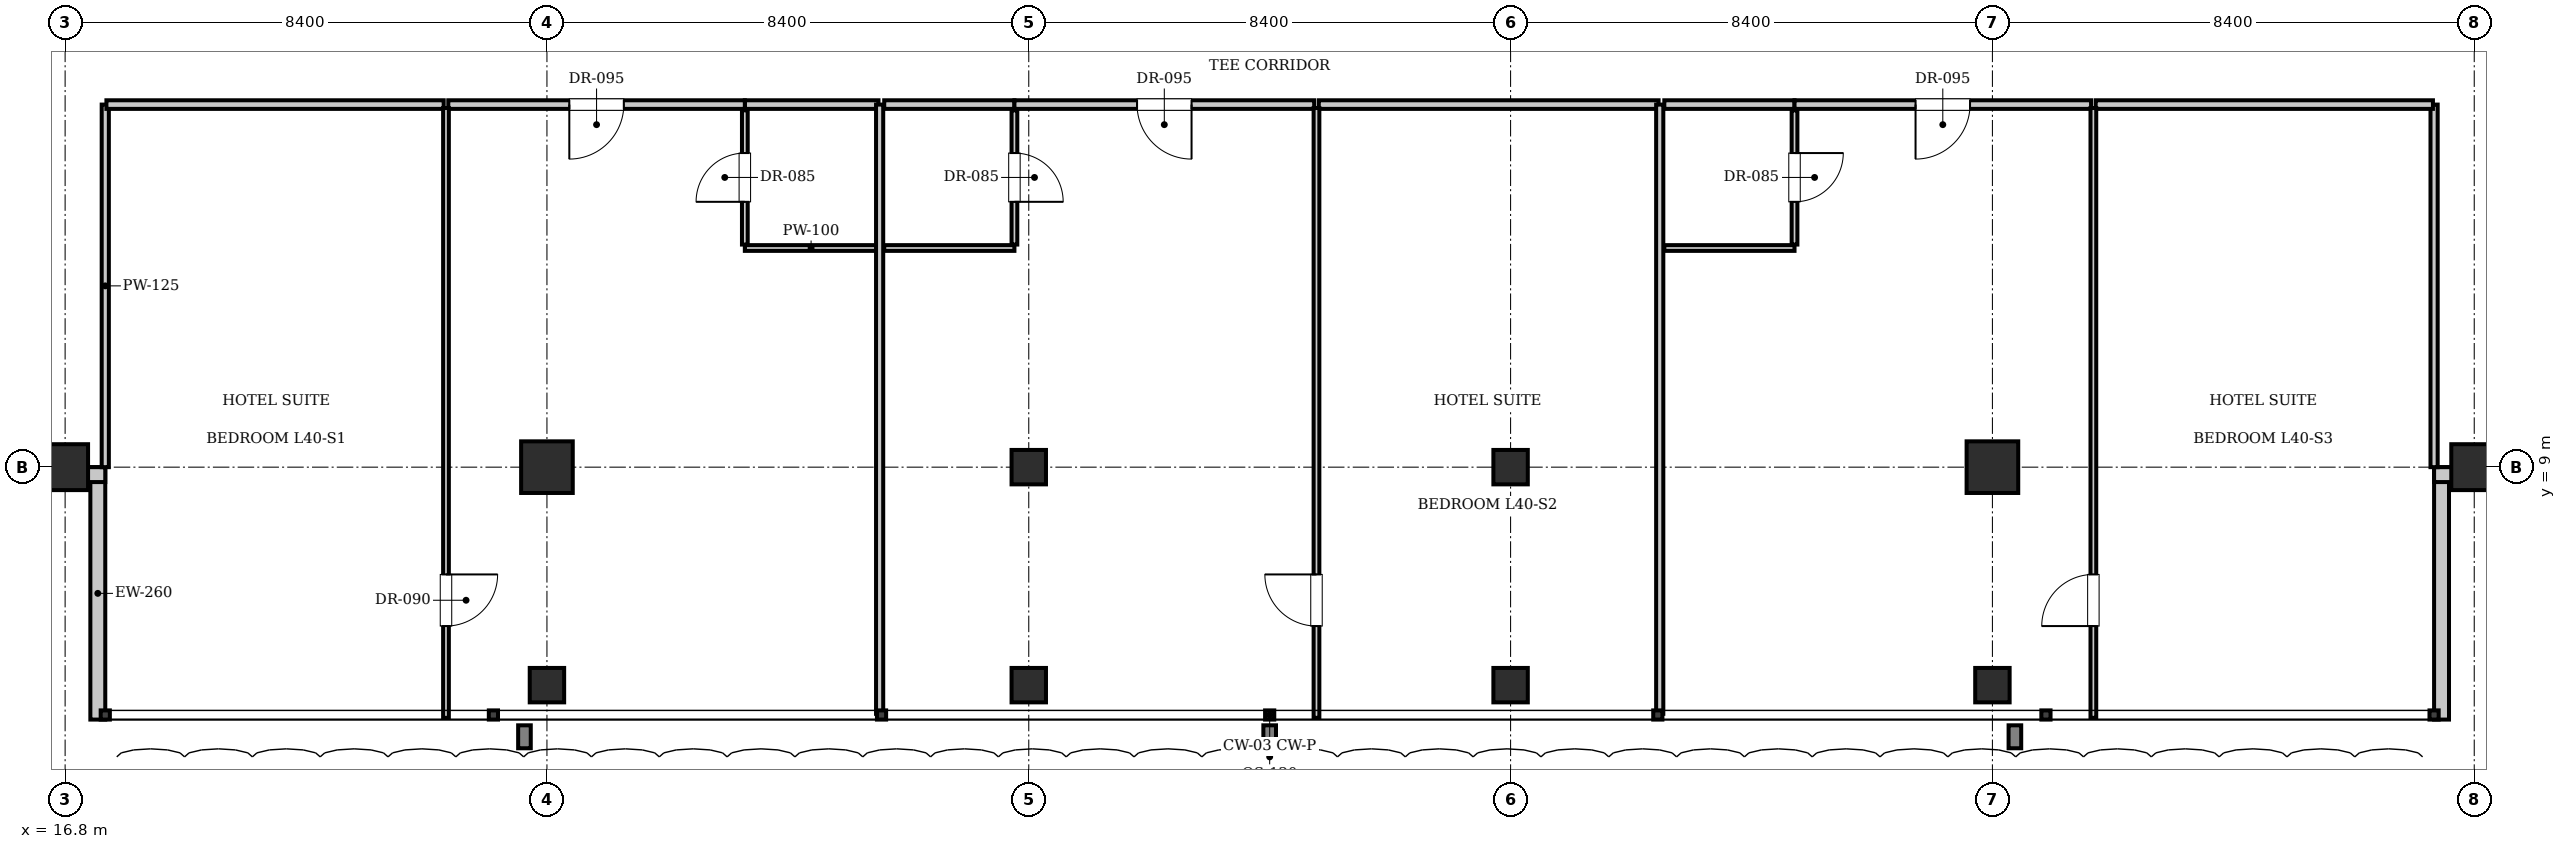
"""IFC4 building model, lengths in metres.
Left out: names, types, materials, properties, quantities, classifications, styles, units other than length and angle.
Written with IfcOpenShell. Run it as: python <this file> out.ifc"""

import sys

from ifc_helpers import new_model, si_unit, direction, frame, frame_2d, origin, origin_2d, place, context, subcontext, project, spatial, rectangle, i_section, extrude, element, fill, save


model = new_model("IFC4")
c1 = context("Model", 3, precision=1e-05, world=origin(), true_north=direction((0.0, 1.0)))
c2 = subcontext(c1, "Body", "Model", "MODEL_VIEW")
j1 = project(units=[si_unit("LENGTHUNIT", "METRE"), si_unit("PLANEANGLEUNIT", "RADIAN")], contexts=[c1])
p1 = place(None, origin())
s1 = spatial("IfcSite", under=j1, at=p1, CompositionType="ELEMENT")
p2 = place(p1, origin())
s2 = spatial("IfcBuilding", under=s1, at=p2, CompositionType="ELEMENT")
p3 = place(p2, frame((0.0, 0.0, 165.9)))
s3 = spatial("IfcBuildingStorey", under=s2, at=p3, CompositionType="ELEMENT", Elevation=165.9)
for number, where, z_axis, x_axis in (
    (1, (25.2, 9.0, 0.0), (0.0, 0.0, 1.0), (1.0, 0.0, 0.0)),
    (2, (50.4, 9.0, 0.0), (0.0, 0.0, 1.0), (1.0, 0.0, 0.0)),
):
    element("IfcColumn", number, at=place(p3, frame(where, z_axis=z_axis, x_axis=x_axis)), inside=s3, PredefinedType="COLUMN", context=c2, shape_type="SweptSolid", body=[
        extrude(rectangle(XDim=0.9, YDim=0.9, at=origin_2d()), origin(), (0.0, 0.0, 1.0), 3.85),
    ])
for number, where, z_axis, x_axis in (
    (3, (33.6, 9.0, 0.0), (0.0, 0.0, 1.0), (1.0, 0.0, 0.0)),
    (4, (42.0, 9.0, 0.0), (0.0, 0.0, 1.0), (1.0, 0.0, 0.0)),
):
    element("IfcColumn", number, at=place(p3, frame(where, z_axis=z_axis, x_axis=x_axis)), inside=s3, PredefinedType="COLUMN", context=c2, shape_type="SweptSolid", body=[
        extrude(i_section(OverallWidth=0.6, OverallDepth=0.6, WebThickness=0.025, FlangeThickness=0.038, at=origin_2d()), origin(), (0.0, 0.0, 1.0), 3.85),
    ])
for number, where, z_axis, x_axis in (
    (5, (16.8, 9.0, 0.0), (0.0, 0.0, 1.0), (1.0, 0.0, 0.0)),
    (6, (58.8, 9.0, 0.0), (0.0, 0.0, 1.0), (1.0, 0.0, 0.0)),
):
    element("IfcColumn", number, at=place(p3, frame(where, z_axis=z_axis, x_axis=x_axis)), inside=s3, PredefinedType="COLUMN", context=c2, shape_type="SweptSolid", body=[
        extrude(rectangle(XDim=0.8, YDim=0.8, at=origin_2d()), origin(), (0.0, 0.0, 1.0), 3.85),
    ])
for number, where, z_axis, x_axis in (
    (7, (25.2, 5.2, 0.0), (0.0, 0.0, 1.0), (1.0, 0.0, 0.0)),
    (8, (33.6, 5.2, 0.0), (0.0, 0.0, 1.0), (1.0, 0.0, 0.0)),
    (9, (42.0, 5.2, 0.0), (0.0, 0.0, 1.0), (1.0, 0.0, 0.0)),
    (10, (50.4, 5.2, 0.0), (0.0, 0.0, 1.0), (1.0, 0.0, 0.0)),
):
    element("IfcColumn", number, at=place(p3, frame(where, z_axis=z_axis, x_axis=x_axis)), inside=s3, PredefinedType="COLUMN", context=c2, shape_type="SweptSolid", body=[
        extrude(i_section(OverallWidth=0.6, OverallDepth=0.6, WebThickness=0.025, FlangeThickness=0.038, at=origin_2d()), origin(), (0.0, 0.0, 1.0), 3.85),
    ])
p4 = place(p3, frame((17.37, 4.6, 0.0), z_axis=(0.0, 0.0, 1.0), x_axis=(0.0, 1.0, 0.0)))
e11 = element("IfcWall", 11, at=p4, inside=s3, PredefinedType="SOLIDWALL", context=c2, shape_type="SweptSolid", body=[
    extrude(rectangle(XDim=4.4, YDim=0.26, at=frame_2d((2.2, 0.0))), origin(), (0.0, 0.0, 1.0), 3.61),
])
p5 = place(p3, frame((17.5, 8.87, 0.0), z_axis=(0.0, 0.0, 1.0), x_axis=(-1.0, 0.0, 0.0)))
e12 = element("IfcWall", 12, at=p5, inside=s3, PredefinedType="SOLIDWALL", context=c2, shape_type="SweptSolid", body=[
    extrude(rectangle(XDim=4.4, YDim=0.26, at=frame_2d((2.2, 0.0))), origin(), (0.0, 0.0, 1.0), 3.007),
])
p6 = place(p3, frame((58.23, 9.0, 0.0), z_axis=(0.0, 0.0, 1.0), x_axis=(0.0, -1.0, 0.0)))
e13 = element("IfcWall", 13, at=p6, inside=s3, PredefinedType="SOLIDWALL", context=c2, shape_type="SweptSolid", body=[
    extrude(rectangle(XDim=4.4, YDim=0.26, at=frame_2d((2.2, 0.0))), origin(), (0.0, 0.0, 1.0), 3.61),
])
p7 = place(p3, frame((62.5, 8.87, 0.0), z_axis=(0.0, 0.0, 1.0), x_axis=(-1.0, 0.0, 0.0)))
e14 = element("IfcWall", 14, at=p7, inside=s3, PredefinedType="SOLIDWALL", context=c2, shape_type="SweptSolid", body=[
    extrude(rectangle(XDim=4.4, YDim=0.26, at=frame_2d((2.2, 0.0))), origin(), (0.0, 0.0, 1.0), 3.007),
])
for number, where, z_axis, x_axis in (
    (15, (17.5, 9.0, 0.0), (0.0, 0.0, 1.0), (0.0, 1.0, 0.0)),
    (16, (58.1, 9.0, 0.0), (0.0, 0.0, 1.0), (0.0, 1.0, 0.0)),
):
    element("IfcWall", number, at=place(p3, frame(where, z_axis=z_axis, x_axis=x_axis)), inside=s3, PredefinedType="PARTITIONING", context=c2, shape_type="SweptSolid", body=[
        extrude(rectangle(XDim=6.32, YDim=0.125, at=frame_2d((3.16, 0.0))), origin(), (0.0, 0.0, 1.0), 3.61),
    ])
p8 = place(p3, frame((28.65, 15.32, 0.0), z_axis=(0.0, 0.0, 1.0), x_axis=(1.0, 0.0, 0.0)))
e17 = element("IfcWall", 17, at=p8, inside=s3, PredefinedType="PARTITIONING", context=c2, shape_type="SweptSolid", body=[
    extrude(rectangle(XDim=2.33, YDim=0.15, at=frame_2d((1.165, 0.0))), origin(), (0.0, 0.0, 1.0), 3.61),
])
p9 = place(p3, frame((28.65, 12.82, 0.0), z_axis=(0.0, 0.0, 1.0), x_axis=(1.0, 0.0, 0.0)))
e18 = element("IfcWall", 18, at=p9, inside=s3, PredefinedType="PARTITIONING", context=c2, shape_type="SweptSolid", body=[
    extrude(rectangle(XDim=2.31, YDim=0.1, at=frame_2d((1.155, 0.0))), origin(), (0.0, 0.0, 1.0), 3.61),
])
p10 = place(p3, frame((28.65, 12.88, 0.0), z_axis=(0.0, 0.0, 1.0), x_axis=(0.0, 1.0, 0.0)))
e19 = element("IfcWall", 19, at=p10, inside=s3, PredefinedType="PARTITIONING", context=c2, shape_type="SweptSolid", body=[
    extrude(rectangle(XDim=2.34, YDim=0.1, at=frame_2d((1.17, 0.0))), origin(), (0.0, 0.0, 1.0), 3.61),
])
p11 = place(p10, frame((0.745, 0.0, 0.0)))
e20 = element("IfcOpeningElement", 20, at=p11, cuts=e19, PredefinedType="OPENING", context=c2, shape_type="SweptSolid", body=[
    extrude(rectangle(XDim=0.85, YDim=2.1, at=frame_2d((0.425, 1.05))), frame((0.0, 0.06, 0.0), z_axis=(0.0, -1.0, 0.0), x_axis=(1.0, 0.0, 0.0)), (0.0, 0.0, 1.0), 0.12),
])
p12 = place(p3, frame((17.52, 15.32, 0.0), z_axis=(0.0, 0.0, 1.0), x_axis=(1.0, 0.0, 0.0)))
e21 = element("IfcWall", 21, at=p12, inside=s3, PredefinedType="PARTITIONING", context=c2, shape_type="SweptSolid", body=[
    extrude(rectangle(XDim=5.88, YDim=0.15, at=frame_2d((2.94, 0.0))), origin(), (0.0, 0.0, 1.0), 3.61),
])
p13 = place(p3, frame((23.48, 15.32, 0.0), z_axis=(0.0, 0.0, 1.0), x_axis=(1.0, 0.0, 0.0)))
e22 = element("IfcWall", 22, at=p13, inside=s3, PredefinedType="PARTITIONING", context=c2, shape_type="SweptSolid", body=[
    extrude(rectangle(XDim=5.17, YDim=0.15, at=frame_2d((2.585, 0.0))), origin(), (0.0, 0.0, 1.0), 3.61),
])
p14 = place(p13, frame((2.11, 0.0, 0.0)))
e23 = element("IfcOpeningElement", 23, at=p14, cuts=e22, PredefinedType="OPENING", context=c2, shape_type="SweptSolid", body=[
    extrude(rectangle(XDim=0.95, YDim=2.15, at=frame_2d((0.475, 1.075))), frame((0.0, 0.085, 0.0), z_axis=(0.0, -1.0, 0.0), x_axis=(1.0, 0.0, 0.0)), (0.0, 0.0, 1.0), 0.17),
])
p15 = place(p3, frame((23.44, 4.63, 0.0), z_axis=(0.0, 0.0, 1.0), x_axis=(0.0, 1.0, 0.0)))
e24 = element("IfcWall", 24, at=p15, inside=s3, PredefinedType="PARTITIONING", context=c2, shape_type="SweptSolid", body=[
    extrude(rectangle(XDim=10.63, YDim=0.1, at=frame_2d((5.315, 0.0))), origin(), (0.0, 0.0, 1.0), 3.61),
])
p16 = place(p15, frame((1.6, 0.0, 0.0)))
e25 = element("IfcOpeningElement", 25, at=p16, cuts=e24, PredefinedType="OPENING", context=c2, shape_type="SweptSolid", body=[
    extrude(rectangle(XDim=0.9, YDim=2.1, at=frame_2d((0.45, 1.05))), frame((0.0, 0.06, 0.0), z_axis=(0.0, -1.0, 0.0), x_axis=(1.0, 0.0, 0.0)), (0.0, 0.0, 1.0), 0.12),
])
p17 = place(p3, frame((31.0, 4.7, 0.0), z_axis=(0.0, 0.0, 1.0), x_axis=(0.0, 1.0, 0.0)))
e26 = element("IfcWall", 26, at=p17, inside=s3, PredefinedType="PARTITIONING", context=c2, shape_type="SweptSolid", body=[
    extrude(rectangle(XDim=10.62, YDim=0.125, at=frame_2d((5.31, 0.0))), origin(), (0.0, 0.0, 1.0), 3.61),
])
p18 = place(p3, frame((31.08, 15.32, 0.0), z_axis=(0.0, 0.0, 1.0), x_axis=(1.0, 0.0, 0.0)))
e27 = element("IfcWall", 27, at=p18, inside=s3, PredefinedType="PARTITIONING", context=c2, shape_type="SweptSolid", body=[
    extrude(rectangle(XDim=2.27, YDim=0.15, at=frame_2d((1.135, 0.0))), origin(), (0.0, 0.0, 1.0), 3.61),
])
p19 = place(p3, frame((31.08, 12.82, 0.0), z_axis=(0.0, 0.0, 1.0), x_axis=(1.0, 0.0, 0.0)))
e28 = element("IfcWall", 28, at=p19, inside=s3, PredefinedType="PARTITIONING", context=c2, shape_type="SweptSolid", body=[
    extrude(rectangle(XDim=2.27, YDim=0.1, at=frame_2d((1.135, 0.0))), origin(), (0.0, 0.0, 1.0), 3.61),
])
p20 = place(p3, frame((33.35, 12.88, 0.0), z_axis=(0.0, 0.0, 1.0), x_axis=(0.0, 1.0, 0.0)))
e29 = element("IfcWall", 29, at=p20, inside=s3, PredefinedType="PARTITIONING", context=c2, shape_type="SweptSolid", body=[
    extrude(rectangle(XDim=2.34, YDim=0.1, at=frame_2d((1.17, 0.0))), origin(), (0.0, 0.0, 1.0), 3.61),
])
p21 = place(p20, frame((0.745, 0.0, 0.0)))
e30 = element("IfcOpeningElement", 30, at=p21, cuts=e29, PredefinedType="OPENING", context=c2, shape_type="SweptSolid", body=[
    extrude(rectangle(XDim=0.85, YDim=2.1, at=frame_2d((0.425, 1.05))), frame((0.0, 0.06, 0.0), z_axis=(0.0, -1.0, 0.0), x_axis=(1.0, 0.0, 0.0)), (0.0, 0.0, 1.0), 0.12),
])
p22 = place(p3, frame((33.35, 15.32, 0.0), z_axis=(0.0, 0.0, 1.0), x_axis=(1.0, 0.0, 0.0)))
e31 = element("IfcWall", 31, at=p22, inside=s3, PredefinedType="PARTITIONING", context=c2, shape_type="SweptSolid", body=[
    extrude(rectangle(XDim=5.226, YDim=0.15, at=frame_2d((2.613, 0.0))), origin(), (0.0, 0.0, 1.0), 3.61),
])
p23 = place(p22, frame((2.138, 0.0, 0.0)))
e32 = element("IfcOpeningElement", 32, at=p23, cuts=e31, PredefinedType="OPENING", context=c2, shape_type="SweptSolid", body=[
    extrude(rectangle(XDim=0.95, YDim=2.15, at=frame_2d((0.475, 1.075))), frame((0.0, 0.085, 0.0), z_axis=(0.0, -1.0, 0.0), x_axis=(1.0, 0.0, 0.0)), (0.0, 0.0, 1.0), 0.17),
])
p24 = place(p3, frame((38.656, 15.32, 0.0), z_axis=(0.0, 0.0, 1.0), x_axis=(1.0, 0.0, 0.0)))
e33 = element("IfcWall", 33, at=p24, inside=s3, PredefinedType="PARTITIONING", context=c2, shape_type="SweptSolid", body=[
    extrude(rectangle(XDim=5.924, YDim=0.15, at=frame_2d((2.962, 0.0))), origin(), (0.0, 0.0, 1.0), 3.61),
])
p25 = place(p3, frame((38.616, 4.63, 0.0), z_axis=(0.0, 0.0, 1.0), x_axis=(0.0, 1.0, 0.0)))
e34 = element("IfcWall", 34, at=p25, inside=s3, PredefinedType="PARTITIONING", context=c2, shape_type="SweptSolid", body=[
    extrude(rectangle(XDim=10.63, YDim=0.1, at=frame_2d((5.315, 0.0))), origin(), (0.0, 0.0, 1.0), 3.61),
])
p26 = place(p25, frame((1.6, 0.0, 0.0)))
e35 = element("IfcOpeningElement", 35, at=p26, cuts=e34, PredefinedType="OPENING", context=c2, shape_type="SweptSolid", body=[
    extrude(rectangle(XDim=0.9, YDim=2.1, at=frame_2d((0.45, 1.05))), frame((0.0, 0.06, 0.0), z_axis=(0.0, -1.0, 0.0), x_axis=(1.0, 0.0, 0.0)), (0.0, 0.0, 1.0), 0.12),
])
p27 = place(p3, frame((44.6, 4.7, 0.0), z_axis=(0.0, 0.0, 1.0), x_axis=(0.0, 1.0, 0.0)))
e36 = element("IfcWall", 36, at=p27, inside=s3, PredefinedType="PARTITIONING", context=c2, shape_type="SweptSolid", body=[
    extrude(rectangle(XDim=10.62, YDim=0.125, at=frame_2d((5.31, 0.0))), origin(), (0.0, 0.0, 1.0), 3.61),
])
p28 = place(p3, frame((44.68, 15.32, 0.0), z_axis=(0.0, 0.0, 1.0), x_axis=(1.0, 0.0, 0.0)))
e37 = element("IfcWall", 37, at=p28, inside=s3, PredefinedType="PARTITIONING", context=c2, shape_type="SweptSolid", body=[
    extrude(rectangle(XDim=2.27, YDim=0.15, at=frame_2d((1.135, 0.0))), origin(), (0.0, 0.0, 1.0), 3.61),
])
p29 = place(p3, frame((44.68, 12.82, 0.0), z_axis=(0.0, 0.0, 1.0), x_axis=(1.0, 0.0, 0.0)))
e38 = element("IfcWall", 38, at=p29, inside=s3, PredefinedType="PARTITIONING", context=c2, shape_type="SweptSolid", body=[
    extrude(rectangle(XDim=2.27, YDim=0.1, at=frame_2d((1.135, 0.0))), origin(), (0.0, 0.0, 1.0), 3.61),
])
p30 = place(p3, frame((46.95, 12.88, 0.0), z_axis=(0.0, 0.0, 1.0), x_axis=(0.0, 1.0, 0.0)))
e39 = element("IfcWall", 39, at=p30, inside=s3, PredefinedType="PARTITIONING", context=c2, shape_type="SweptSolid", body=[
    extrude(rectangle(XDim=2.34, YDim=0.1, at=frame_2d((1.17, 0.0))), origin(), (0.0, 0.0, 1.0), 3.61),
])
p31 = place(p30, frame((0.745, 0.0, 0.0)))
e40 = element("IfcOpeningElement", 40, at=p31, cuts=e39, PredefinedType="OPENING", context=c2, shape_type="SweptSolid", body=[
    extrude(rectangle(XDim=0.85, YDim=2.1, at=frame_2d((0.425, 1.05))), frame((0.0, 0.06, 0.0), z_axis=(0.0, -1.0, 0.0), x_axis=(1.0, 0.0, 0.0)), (0.0, 0.0, 1.0), 0.12),
])
p32 = place(p3, frame((46.95, 15.32, 0.0), z_axis=(0.0, 0.0, 1.0), x_axis=(1.0, 0.0, 0.0)))
e41 = element("IfcWall", 41, at=p32, inside=s3, PredefinedType="PARTITIONING", context=c2, shape_type="SweptSolid", body=[
    extrude(rectangle(XDim=5.17, YDim=0.15, at=frame_2d((2.585, 0.0))), origin(), (0.0, 0.0, 1.0), 3.61),
])
p33 = place(p32, frame((2.11, 0.0, 0.0)))
e42 = element("IfcOpeningElement", 42, at=p33, cuts=e41, PredefinedType="OPENING", context=c2, shape_type="SweptSolid", body=[
    extrude(rectangle(XDim=0.95, YDim=2.15, at=frame_2d((0.475, 1.075))), frame((0.0, 0.085, 0.0), z_axis=(0.0, -1.0, 0.0), x_axis=(1.0, 0.0, 0.0)), (0.0, 0.0, 1.0), 0.17),
])
p34 = place(p3, frame((52.2, 15.32, 0.0), z_axis=(0.0, 0.0, 1.0), x_axis=(1.0, 0.0, 0.0)))
e43 = element("IfcWall", 43, at=p34, inside=s3, PredefinedType="PARTITIONING", context=c2, shape_type="SweptSolid", body=[
    extrude(rectangle(XDim=5.88, YDim=0.15, at=frame_2d((2.94, 0.0))), origin(), (0.0, 0.0, 1.0), 3.61),
])
p35 = place(p3, frame((52.16, 4.63, 0.0), z_axis=(0.0, 0.0, 1.0), x_axis=(0.0, 1.0, 0.0)))
e44 = element("IfcWall", 44, at=p35, inside=s3, PredefinedType="PARTITIONING", context=c2, shape_type="SweptSolid", body=[
    extrude(rectangle(XDim=10.63, YDim=0.1, at=frame_2d((5.315, 0.0))), origin(), (0.0, 0.0, 1.0), 3.61),
])
p36 = place(p35, frame((1.6, 0.0, 0.0)))
e45 = element("IfcOpeningElement", 45, at=p36, cuts=e44, PredefinedType="OPENING", context=c2, shape_type="SweptSolid", body=[
    extrude(rectangle(XDim=0.9, YDim=2.1, at=frame_2d((0.45, 1.05))), frame((0.0, 0.06, 0.0), z_axis=(0.0, -1.0, 0.0), x_axis=(1.0, 0.0, 0.0)), (0.0, 0.0, 1.0), 0.12),
])
p37 = place(p11, origin())
e46 = element("IfcDoor", 46, at=p37, inside=s3, OperationType="SINGLE_SWING_LEFT", PredefinedType="DOOR", context=c2, shape_type="SweptSolid", body=[
    extrude(rectangle(XDim=0.85, YDim=2.1, at=frame_2d((0.425, 1.05))), frame((0.0, 0.025, 0.0), z_axis=(0.0, -1.0, 0.0), x_axis=(1.0, 0.0, 0.0)), (0.0, 0.0, 1.0), 0.05),
])
fill(e20, e46)
p38 = place(p14, frame((0.95, 0.0, 0.0), z_axis=(0.0, 0.0, 1.0), x_axis=(-1.0, 0.0, 0.0)))
e47 = element("IfcDoor", 47, at=p38, inside=s3, OperationType="SINGLE_SWING_RIGHT", PredefinedType="DOOR", context=c2, shape_type="SweptSolid", body=[
    extrude(rectangle(XDim=0.95, YDim=2.15, at=frame_2d((0.475, 1.075))), frame((0.0, 0.025, 0.0), z_axis=(0.0, -1.0, 0.0), x_axis=(1.0, 0.0, 0.0)), (0.0, 0.0, 1.0), 0.05),
])
fill(e23, e47)
p39 = place(p16, frame((0.9, 0.0, 0.0), z_axis=(0.0, 0.0, 1.0), x_axis=(-1.0, 0.0, 0.0)))
e48 = element("IfcDoor", 48, at=p39, inside=s3, OperationType="SINGLE_SWING_LEFT", PredefinedType="DOOR", context=c2, shape_type="SweptSolid", body=[
    extrude(rectangle(XDim=0.9, YDim=2.1, at=frame_2d((0.45, 1.05))), frame((0.0, 0.025, 0.0), z_axis=(0.0, -1.0, 0.0), x_axis=(1.0, 0.0, 0.0)), (0.0, 0.0, 1.0), 0.05),
])
fill(e25, e48)
p40 = place(p21, frame((0.85, 0.0, 0.0), z_axis=(0.0, 0.0, 1.0), x_axis=(-1.0, 0.0, 0.0)))
e49 = element("IfcDoor", 49, at=p40, inside=s3, OperationType="SINGLE_SWING_RIGHT", PredefinedType="DOOR", context=c2, shape_type="SweptSolid", body=[
    extrude(rectangle(XDim=0.85, YDim=2.1, at=frame_2d((0.425, 1.05))), frame((0.0, 0.025, 0.0), z_axis=(0.0, -1.0, 0.0), x_axis=(1.0, 0.0, 0.0)), (0.0, 0.0, 1.0), 0.05),
])
fill(e30, e49)
p41 = place(p23, frame((0.95, 0.0, 0.0), z_axis=(0.0, 0.0, 1.0), x_axis=(-1.0, 0.0, 0.0)))
e50 = element("IfcDoor", 50, at=p41, inside=s3, OperationType="SINGLE_SWING_LEFT", PredefinedType="DOOR", context=c2, shape_type="SweptSolid", body=[
    extrude(rectangle(XDim=0.95, YDim=2.15, at=frame_2d((0.475, 1.075))), frame((0.0, 0.025, 0.0), z_axis=(0.0, -1.0, 0.0), x_axis=(1.0, 0.0, 0.0)), (0.0, 0.0, 1.0), 0.05),
])
fill(e32, e50)
p42 = place(p26, origin())
e51 = element("IfcDoor", 51, at=p42, inside=s3, OperationType="SINGLE_SWING_RIGHT", PredefinedType="DOOR", context=c2, shape_type="SweptSolid", body=[
    extrude(rectangle(XDim=0.9, YDim=2.1, at=frame_2d((0.45, 1.05))), frame((0.0, 0.025, 0.0), z_axis=(0.0, -1.0, 0.0), x_axis=(1.0, 0.0, 0.0)), (0.0, 0.0, 1.0), 0.05),
])
fill(e35, e51)
p43 = place(p31, frame((0.85, 0.0, 0.0), z_axis=(0.0, 0.0, 1.0), x_axis=(-1.0, 0.0, 0.0)))
e52 = element("IfcDoor", 52, at=p43, inside=s3, OperationType="SINGLE_SWING_LEFT", PredefinedType="DOOR", context=c2, shape_type="SweptSolid", body=[
    extrude(rectangle(XDim=0.85, YDim=2.1, at=frame_2d((0.425, 1.05))), frame((0.0, 0.025, 0.0), z_axis=(0.0, -1.0, 0.0), x_axis=(1.0, 0.0, 0.0)), (0.0, 0.0, 1.0), 0.05),
])
fill(e40, e52)
p44 = place(p33, frame((0.95, 0.0, 0.0), z_axis=(0.0, 0.0, 1.0), x_axis=(-1.0, 0.0, 0.0)))
e53 = element("IfcDoor", 53, at=p44, inside=s3, OperationType="SINGLE_SWING_RIGHT", PredefinedType="DOOR", context=c2, shape_type="SweptSolid", body=[
    extrude(rectangle(XDim=0.95, YDim=2.15, at=frame_2d((0.475, 1.075))), frame((0.0, 0.025, 0.0), z_axis=(0.0, -1.0, 0.0), x_axis=(1.0, 0.0, 0.0)), (0.0, 0.0, 1.0), 0.05),
])
fill(e42, e53)
p45 = place(p36, origin())
e54 = element("IfcDoor", 54, at=p45, inside=s3, OperationType="SINGLE_SWING_LEFT", PredefinedType="DOOR", context=c2, shape_type="SweptSolid", body=[
    extrude(rectangle(XDim=0.9, YDim=2.1, at=frame_2d((0.45, 1.05))), frame((0.0, 0.025, 0.0), z_axis=(0.0, -1.0, 0.0), x_axis=(1.0, 0.0, 0.0)), (0.0, 0.0, 1.0), 0.05),
])
fill(e45, e54)
save(model, sys.argv[1])
